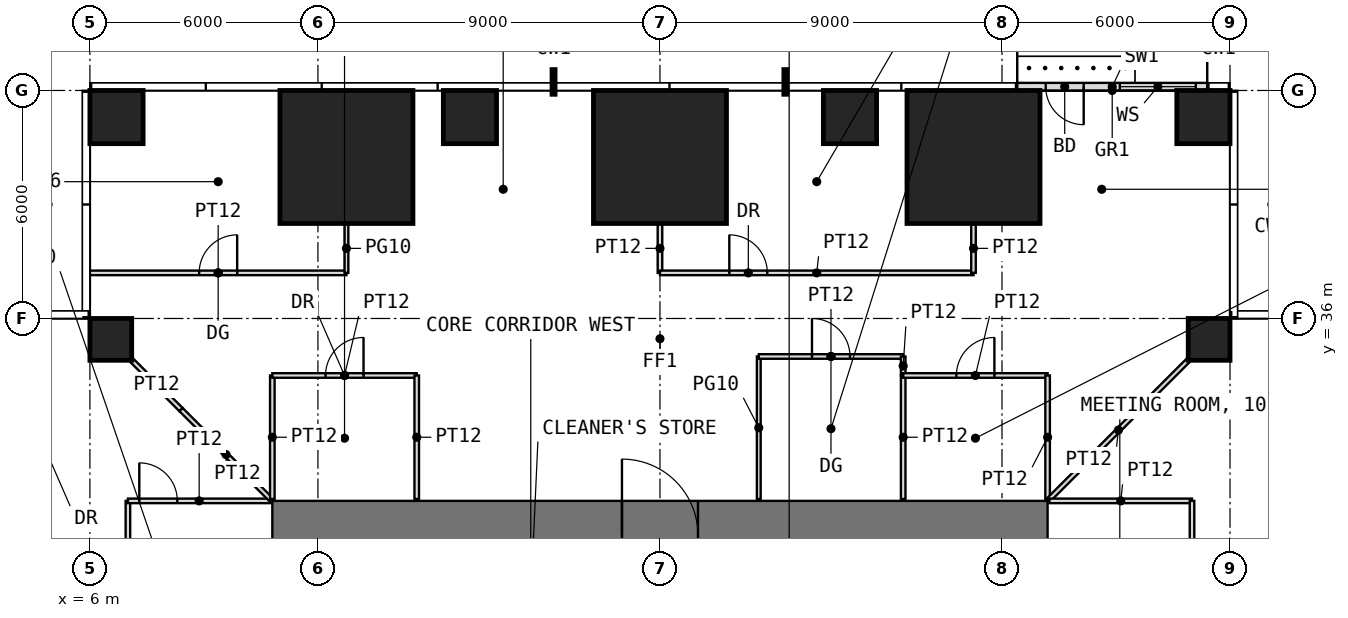
"""IFC4 building model, lengths in metres.
Left out: names, types, materials, properties, quantities, classifications, styles, units other than length and angle.
Written with IfcOpenShell. Run it as: python <this file> out.ifc"""

import sys

from ifc_helpers import new_model, si_unit, direction, frame, frame_2d, origin, origin_2d, place, context, subcontext, project, spatial, rectangle, extrude, element, fill, save


model = new_model("IFC4")
c1 = context("Model", 3, precision=1e-05, world=origin(), true_north=direction((0.0, 1.0)))
c2 = subcontext(c1, "Body", "Model", "MODEL_VIEW")
j1 = project(units=[si_unit("LENGTHUNIT", "METRE"), si_unit("PLANEANGLEUNIT", "RADIAN")], contexts=[c1])
p1 = place(None, origin())
s1 = spatial("IfcSite", under=j1, at=p1, CompositionType="ELEMENT")
p2 = place(p1, origin())
s2 = spatial("IfcBuilding", under=s1, at=p2, CompositionType="ELEMENT")
p3 = place(p2, frame((0.0, 0.0, 70.5)))
s3 = spatial("IfcBuildingStorey", under=s2, at=p3, CompositionType="ELEMENT", Elevation=70.5)
for number, where, z_axis, x_axis in (
    (1, (6.55, 35.45, 0.0), (0.0, 0.0, 1.0), (1.0, 0.0, 0.0)),
    (2, (35.45, 35.45, 0.0), (0.0, 0.0, 1.0), (1.0, 0.0, 0.0)),
):
    element("IfcColumn", number, at=place(p3, frame(where, z_axis=z_axis, x_axis=x_axis)), inside=s3, PredefinedType="COLUMN", context=c2, shape_type="SweptSolid", body=[
        extrude(rectangle(XDim=1.1, YDim=1.1, at=origin_2d()), origin(), (0.0, 0.0, 1.0), 4.0),
    ])
p4 = place(p3, frame((6.7, 41.3, 0.0), z_axis=(0.0, 0.0, 1.0), x_axis=(1.0, 0.0, 0.0)))
e3 = element("IfcColumn", 3, at=p4, inside=s3, PredefinedType="COLUMN", context=c2, shape_type="SweptSolid", body=[
    extrude(rectangle(XDim=1.4, YDim=1.4, at=origin_2d()), origin(), (0.0, 0.0, 1.0), 4.0),
])
p5 = place(p3, frame((12.75, 40.25, 0.0), z_axis=(0.0, 0.0, 1.0), x_axis=(1.0, 0.0, 0.0)))
e4 = element("IfcColumn", 4, at=p5, inside=s3, PredefinedType="COLUMN", context=c2, shape_type="SweptSolid", body=[
    extrude(rectangle(XDim=3.5, YDim=3.5, at=origin_2d()), origin(), (0.0, 0.0, 1.0), 4.0),
])
p6 = place(p3, frame((16.0, 41.3, 0.0), z_axis=(0.0, 0.0, 1.0), x_axis=(1.0, 0.0, 0.0)))
e5 = element("IfcColumn", 5, at=p6, inside=s3, PredefinedType="COLUMN", context=c2, shape_type="SweptSolid", body=[
    extrude(rectangle(XDim=1.4, YDim=1.4, at=origin_2d()), origin(), (0.0, 0.0, 1.0), 4.0),
])
p7 = place(p3, frame((21.0, 40.25, 0.0), z_axis=(0.0, 0.0, 1.0), x_axis=(1.0, 0.0, 0.0)))
e6 = element("IfcColumn", 6, at=p7, inside=s3, PredefinedType="COLUMN", context=c2, shape_type="SweptSolid", body=[
    extrude(rectangle(XDim=3.5, YDim=3.5, at=origin_2d()), origin(), (0.0, 0.0, 1.0), 4.0),
])
p8 = place(p3, frame((26.0, 41.3, 0.0), z_axis=(0.0, 0.0, 1.0), x_axis=(1.0, 0.0, 0.0)))
e7 = element("IfcColumn", 7, at=p8, inside=s3, PredefinedType="COLUMN", context=c2, shape_type="SweptSolid", body=[
    extrude(rectangle(XDim=1.4, YDim=1.4, at=origin_2d()), origin(), (0.0, 0.0, 1.0), 4.0),
])
p9 = place(p3, frame((29.25, 40.25, 0.0), z_axis=(0.0, 0.0, 1.0), x_axis=(1.0, 0.0, 0.0)))
e8 = element("IfcColumn", 8, at=p9, inside=s3, PredefinedType="COLUMN", context=c2, shape_type="SweptSolid", body=[
    extrude(rectangle(XDim=3.5, YDim=3.5, at=origin_2d()), origin(), (0.0, 0.0, 1.0), 4.0),
])
p10 = place(p3, frame((35.3, 41.3, 0.0), z_axis=(0.0, 0.0, 1.0), x_axis=(1.0, 0.0, 0.0)))
e9 = element("IfcColumn", 9, at=p10, inside=s3, PredefinedType="COLUMN", context=c2, shape_type="SweptSolid", body=[
    extrude(rectangle(XDim=1.4, YDim=1.4, at=origin_2d()), origin(), (0.0, 0.0, 1.0), 4.0),
])
p11 = place(p3, frame((35.4, 42.1, 0.0), z_axis=(0.0, 0.0, 1.0), x_axis=(-1.0, 0.0, 0.0)))
e10 = element("IfcWall", 10, at=p11, inside=s3, PredefinedType="USERDEFINED", context=c2, shape_type="SweptSolid", body=[
    extrude(rectangle(XDim=5.0, YDim=0.2, at=frame_2d((2.5, 0.0))), origin(), (0.0, 0.0, 1.0), 3.75),
])
p12 = place(p11, frame((3.25, 0.0, 0.0)))
e11 = element("IfcOpeningElement", 11, at=p12, cuts=e10, PredefinedType="OPENING", context=c2, shape_type="SweptSolid", body=[
    extrude(rectangle(XDim=1.0, YDim=2.4, at=frame_2d((0.5, 1.2))), frame((0.0, 0.11, 0.0), z_axis=(0.0, -1.0, 0.0), x_axis=(1.0, 0.0, 0.0)), (0.0, 0.0, 1.0), 0.22),
])
p13 = place(p11, frame((0.3, 0.0, 0.3)))
e12 = element("IfcOpeningElement", 12, at=p13, cuts=e10, PredefinedType="OPENING", context=c2, shape_type="SweptSolid", body=[
    extrude(rectangle(XDim=2.0, YDim=2.7, at=frame_2d((1.0, 1.35))), frame((0.0, 0.11, 0.0), z_axis=(0.0, -1.0, 0.0), x_axis=(1.0, 0.0, 0.0)), (0.0, 0.0, 1.0), 0.22),
])
p14 = place(p3, frame((10.8, 30.3, -0.05), z_axis=(0.0, 0.0, 1.0), x_axis=(1.0, 0.0, 0.0)))
e13 = element("IfcWall", 13, at=p14, inside=s3, PredefinedType="SHEAR", context=c2, shape_type="SweptSolid", body=[
    extrude(rectangle(XDim=20.4, YDim=1.8, at=frame_2d((10.2, 0.0))), origin(), (0.0, 0.0, 1.0), 4.0),
])
p15 = place(p14, frame((9.2, 0.0, 0.05)))
e14 = element("IfcOpeningElement", 14, at=p15, cuts=e13, PredefinedType="OPENING", context=c2, shape_type="SweptSolid", body=[
    extrude(rectangle(XDim=2.0, YDim=2.2, at=frame_2d((1.0, 1.1))), frame((0.0, 0.91, 0.0), z_axis=(0.0, -1.0, 0.0), x_axis=(1.0, 0.0, 0.0)), (0.0, 0.0, 1.0), 1.82),
])
p16 = place(p3, frame((6.0, 37.2, 0.0), z_axis=(0.0, 0.0, 1.0), x_axis=(1.0, 0.0, 0.0)))
e15 = element("IfcWall", 15, at=p16, inside=s3, PredefinedType="PARTITIONING", context=c2, shape_type="SweptSolid", body=[
    extrude(rectangle(XDim=6.75, YDim=0.12, at=frame_2d((3.375, 0.0))), origin(), (0.0, 0.0, 1.0), 3.75),
])
p17 = place(p16, frame((2.875, 0.0, 0.0)))
e16 = element("IfcOpeningElement", 16, at=p17, cuts=e15, PredefinedType="OPENING", context=c2, shape_type="SweptSolid", body=[
    extrude(rectangle(XDim=1.0, YDim=2.4, at=frame_2d((0.5, 1.2))), frame((0.0, 0.07, 0.0), z_axis=(0.0, -1.0, 0.0), x_axis=(1.0, 0.0, 0.0)), (0.0, 0.0, 1.0), 0.14),
])
p18 = place(p3, frame((7.0, 28.4, 0.0), z_axis=(0.0, 0.0, 1.0), x_axis=(0.0, 1.0, 0.0)))
e17 = element("IfcWall", 17, at=p18, inside=s3, PredefinedType="PARTITIONING", context=c2, shape_type="SweptSolid", body=[
    extrude(rectangle(XDim=2.8, YDim=0.12, at=frame_2d((1.4, 0.0))), origin(), (0.0, 0.0, 1.0), 3.75),
])
p19 = place(p3, frame((7.0, 31.2, 0.0), z_axis=(0.0, 0.0, 1.0), x_axis=(1.0, 0.0, 0.0)))
e18 = element("IfcWall", 18, at=p19, inside=s3, PredefinedType="PARTITIONING", context=c2, shape_type="SweptSolid", body=[
    extrude(rectangle(XDim=3.75, YDim=0.12, at=frame_2d((1.875, 0.0))), origin(), (0.0, 0.0, 1.0), 3.75),
])
p20 = place(p19, frame((0.3, 0.0, 0.0)))
e19 = element("IfcOpeningElement", 19, at=p20, cuts=e18, PredefinedType="OPENING", context=c2, shape_type="SweptSolid", body=[
    extrude(rectangle(XDim=1.0, YDim=2.4, at=frame_2d((0.5, 1.2))), frame((0.0, 0.07, 0.0), z_axis=(0.0, -1.0, 0.0), x_axis=(1.0, 0.0, 0.0)), (0.0, 0.0, 1.0), 0.14),
])
p21 = place(p3, frame((7.11, 34.89, 0.0), z_axis=(0.0, 0.0, 1.0), x_axis=(0.707106781187, -0.707106781187, 0.0)))
e20 = element("IfcWall", 20, at=p21, inside=s3, PredefinedType="PARTITIONING", context=c2, shape_type="SweptSolid", body=[
    extrude(rectangle(XDim=1.822, YDim=0.12, at=frame_2d((0.911, 0.0))), origin(), (0.0, 0.0, 1.0), 3.75),
])
p22 = place(p3, frame((8.398, 33.602, 0.0), z_axis=(0.0, 0.0, 1.0), x_axis=(0.707106781187, -0.707106781187, 0.0)))
e21 = element("IfcWall", 21, at=p22, inside=s3, PredefinedType="PARTITIONING", context=c2, shape_type="SweptSolid", body=[
    extrude(rectangle(XDim=3.346, YDim=0.12, at=frame_2d((1.673, 0.0))), origin(), (0.0, 0.0, 1.0), 3.75),
])
p23 = place(p3, frame((10.8, 31.25, 0.0), z_axis=(0.0, 0.0, 1.0), x_axis=(0.0, 1.0, 0.0)))
e22 = element("IfcWall", 22, at=p23, inside=s3, PredefinedType="PARTITIONING", context=c2, shape_type="SweptSolid", body=[
    extrude(rectangle(XDim=3.25, YDim=0.12, at=frame_2d((1.625, 0.0))), origin(), (0.0, 0.0, 1.0), 3.75),
])
p24 = place(p3, frame((10.8, 34.5, 0.0), z_axis=(0.0, 0.0, 1.0), x_axis=(1.0, 0.0, 0.0)))
e23 = element("IfcWall", 23, at=p24, inside=s3, PredefinedType="PARTITIONING", context=c2, shape_type="SweptSolid", body=[
    extrude(rectangle(XDim=3.8, YDim=0.12, at=frame_2d((1.9, 0.0))), origin(), (0.0, 0.0, 1.0), 3.75),
])
p25 = place(p24, frame((1.4, 0.0, 0.0)))
e24 = element("IfcOpeningElement", 24, at=p25, cuts=e23, PredefinedType="OPENING", context=c2, shape_type="SweptSolid", body=[
    extrude(rectangle(XDim=1.0, YDim=2.2, at=frame_2d((0.5, 1.1))), frame((0.0, 0.07, 0.0), z_axis=(0.0, -1.0, 0.0), x_axis=(1.0, 0.0, 0.0)), (0.0, 0.0, 1.0), 0.14),
])
p26 = place(p3, frame((12.75, 37.2, 0.0), z_axis=(0.0, 0.0, 1.0), x_axis=(0.0, 1.0, 0.0)))
e25 = element("IfcWall", 25, at=p26, inside=s3, PredefinedType="PARTITIONING", context=c2, shape_type="SweptSolid", body=[
    extrude(rectangle(XDim=1.29, YDim=0.1, at=frame_2d((0.645, 0.0))), origin(), (0.0, 0.0, 1.0), 3.75),
])
p27 = place(p3, frame((14.6, 31.25, 0.0), z_axis=(0.0, 0.0, 1.0), x_axis=(0.0, 1.0, 0.0)))
e26 = element("IfcWall", 26, at=p27, inside=s3, PredefinedType="PARTITIONING", context=c2, shape_type="SweptSolid", body=[
    extrude(rectangle(XDim=3.25, YDim=0.12, at=frame_2d((1.625, 0.0))), origin(), (0.0, 0.0, 1.0), 3.75),
])
p28 = place(p3, frame((21.0, 37.2, 0.0), z_axis=(0.0, 0.0, 1.0), x_axis=(0.0, 1.0, 0.0)))
e27 = element("IfcWall", 27, at=p28, inside=s3, PredefinedType="PARTITIONING", context=c2, shape_type="SweptSolid", body=[
    extrude(rectangle(XDim=1.29, YDim=0.12, at=frame_2d((0.645, 0.0))), origin(), (0.0, 0.0, 1.0), 3.75),
])
p29 = place(p3, frame((21.0, 37.2, 0.0), z_axis=(0.0, 0.0, 1.0), x_axis=(1.0, 0.0, 0.0)))
e28 = element("IfcWall", 28, at=p29, inside=s3, PredefinedType="PARTITIONING", context=c2, shape_type="SweptSolid", body=[
    extrude(rectangle(XDim=8.25, YDim=0.12, at=frame_2d((4.125, 0.0))), origin(), (0.0, 0.0, 1.0), 3.75),
])
p30 = place(p29, frame((1.825, 0.0, 0.0)))
e29 = element("IfcOpeningElement", 29, at=p30, cuts=e28, PredefinedType="OPENING", context=c2, shape_type="SweptSolid", body=[
    extrude(rectangle(XDim=1.0, YDim=2.2, at=frame_2d((0.5, 1.1))), frame((0.0, 0.07, 0.0), z_axis=(0.0, -1.0, 0.0), x_axis=(1.0, 0.0, 0.0)), (0.0, 0.0, 1.0), 0.14),
])
p31 = place(p3, frame((23.6, 31.25, 0.0), z_axis=(0.0, 0.0, 1.0), x_axis=(0.0, 1.0, 0.0)))
e30 = element("IfcWall", 30, at=p31, inside=s3, PredefinedType="PARTITIONING", context=c2, shape_type="SweptSolid", body=[
    extrude(rectangle(XDim=3.75, YDim=0.1, at=frame_2d((1.875, 0.0))), origin(), (0.0, 0.0, 1.0), 3.75),
])
p32 = place(p3, frame((23.6, 35.0, 0.0), z_axis=(0.0, 0.0, 1.0), x_axis=(1.0, 0.0, 0.0)))
e31 = element("IfcWall", 31, at=p32, inside=s3, PredefinedType="PARTITIONING", context=c2, shape_type="SweptSolid", body=[
    extrude(rectangle(XDim=3.8, YDim=0.12, at=frame_2d((1.9, 0.0))), origin(), (0.0, 0.0, 1.0), 3.75),
])
p33 = place(p32, frame((1.4, 0.0, 0.0)))
e32 = element("IfcOpeningElement", 32, at=p33, cuts=e31, PredefinedType="OPENING", context=c2, shape_type="SweptSolid", body=[
    extrude(rectangle(XDim=1.0, YDim=2.4, at=frame_2d((0.5, 1.2))), frame((0.0, 0.07, 0.0), z_axis=(0.0, -1.0, 0.0), x_axis=(1.0, 0.0, 0.0)), (0.0, 0.0, 1.0), 0.14),
])
p34 = place(p3, frame((27.4, 31.25, 0.0), z_axis=(0.0, 0.0, 1.0), x_axis=(0.0, 1.0, 0.0)))
e33 = element("IfcWall", 33, at=p34, inside=s3, PredefinedType="PARTITIONING", context=c2, shape_type="SweptSolid", body=[
    extrude(rectangle(XDim=3.25, YDim=0.12, at=frame_2d((1.625, 0.0))), origin(), (0.0, 0.0, 1.0), 3.75),
])
p35 = place(p3, frame((27.4, 34.5, 0.0), z_axis=(0.0, 0.0, 1.0), x_axis=(0.0, 1.0, 0.0)))
e34 = element("IfcWall", 34, at=p35, inside=s3, PredefinedType="PARTITIONING", context=c2, shape_type="SweptSolid", body=[
    extrude(rectangle(XDim=0.5, YDim=0.12, at=frame_2d((0.25, 0.0))), origin(), (0.0, 0.0, 1.0), 3.75),
])
p36 = place(p3, frame((27.4, 34.5, 0.0), z_axis=(0.0, 0.0, 1.0), x_axis=(1.0, 0.0, 0.0)))
e35 = element("IfcWall", 35, at=p36, inside=s3, PredefinedType="PARTITIONING", context=c2, shape_type="SweptSolid", body=[
    extrude(rectangle(XDim=3.8, YDim=0.12, at=frame_2d((1.9, 0.0))), origin(), (0.0, 0.0, 1.0), 3.75),
])
p37 = place(p36, frame((1.4, 0.0, 0.0)))
e36 = element("IfcOpeningElement", 36, at=p37, cuts=e35, PredefinedType="OPENING", context=c2, shape_type="SweptSolid", body=[
    extrude(rectangle(XDim=1.0, YDim=2.2, at=frame_2d((0.5, 1.1))), frame((0.0, 0.07, 0.0), z_axis=(0.0, -1.0, 0.0), x_axis=(1.0, 0.0, 0.0)), (0.0, 0.0, 1.0), 0.14),
])
p38 = place(p3, frame((29.25, 37.2, 0.0), z_axis=(0.0, 0.0, 1.0), x_axis=(0.0, 1.0, 0.0)))
e37 = element("IfcWall", 37, at=p38, inside=s3, PredefinedType="PARTITIONING", context=c2, shape_type="SweptSolid", body=[
    extrude(rectangle(XDim=1.29, YDim=0.12, at=frame_2d((0.645, 0.0))), origin(), (0.0, 0.0, 1.0), 3.75),
])
p39 = place(p3, frame((31.2, 31.25, 0.0), z_axis=(0.0, 0.0, 1.0), x_axis=(0.0, 1.0, 0.0)))
e38 = element("IfcWall", 38, at=p39, inside=s3, PredefinedType="PARTITIONING", context=c2, shape_type="SweptSolid", body=[
    extrude(rectangle(XDim=3.25, YDim=0.12, at=frame_2d((1.625, 0.0))), origin(), (0.0, 0.0, 1.0), 3.75),
])
p40 = place(p3, frame((31.235, 31.235, 0.0), z_axis=(0.0, 0.0, 1.0), x_axis=(0.707106781187, 0.707106781187, 0.0)))
e39 = element("IfcWall", 39, at=p40, inside=s3, PredefinedType="PARTITIONING", context=c2, shape_type="SweptSolid", body=[
    extrude(rectangle(XDim=5.168, YDim=0.12, at=frame_2d((2.584, 0.0))), origin(), (0.0, 0.0, 1.0), 3.75),
])
p41 = place(p3, frame((31.25, 31.2, 0.0), z_axis=(0.0, 0.0, 1.0), x_axis=(1.0, 0.0, 0.0)))
e40 = element("IfcWall", 40, at=p41, inside=s3, PredefinedType="PARTITIONING", context=c2, shape_type="SweptSolid", body=[
    extrude(rectangle(XDim=3.75, YDim=0.12, at=frame_2d((1.875, 0.0))), origin(), (0.0, 0.0, 1.0), 3.75),
])
p42 = place(p3, frame((35.0, 24.4, 0.0), z_axis=(0.0, 0.0, 1.0), x_axis=(0.0, 1.0, 0.0)))
e41 = element("IfcWall", 41, at=p42, inside=s3, PredefinedType="PARTITIONING", context=c2, shape_type="SweptSolid", body=[
    extrude(rectangle(XDim=6.8, YDim=0.12, at=frame_2d((3.4, 0.0))), origin(), (0.0, 0.0, 1.0), 3.75),
])
p43 = place(p42, frame((2.9, 0.0, 0.0)))
e42 = element("IfcOpeningElement", 42, at=p43, cuts=e41, PredefinedType="OPENING", context=c2, shape_type="SweptSolid", body=[
    extrude(rectangle(XDim=1.0, YDim=2.4, at=frame_2d((0.5, 1.2))), frame((0.0, 0.07, 0.0), z_axis=(0.0, -1.0, 0.0), x_axis=(1.0, 0.0, 0.0)), (0.0, 0.0, 1.0), 0.14),
])
p44 = place(p12, origin())
e43 = element("IfcDoor", 43, at=p44, inside=s3, OperationType="SINGLE_SWING_LEFT", PredefinedType="DOOR", context=c2, shape_type="SweptSolid", body=[
    extrude(rectangle(XDim=1.0, YDim=2.4, at=frame_2d((0.5, 1.2))), frame((0.0, 0.025, 0.0), z_axis=(0.0, -1.0, 0.0), x_axis=(1.0, 0.0, 0.0)), (0.0, 0.0, 1.0), 0.05),
])
fill(e11, e43)
p45 = place(p13, origin())
e44 = element("IfcWindow", 44, at=p45, inside=s3, PartitioningType="SINGLE_PANEL", PredefinedType="WINDOW", context=c2, shape_type="SweptSolid", body=[
    extrude(rectangle(XDim=2.0, YDim=2.7, at=frame_2d((1.0, 1.35))), frame((0.0, 0.03, 0.0), z_axis=(0.0, -1.0, 0.0), x_axis=(1.0, 0.0, 0.0)), (0.0, 0.0, 1.0), 0.06),
])
fill(e12, e44)
p46 = place(p15, origin())
e45 = element("IfcDoor", 45, at=p46, inside=s3, OperationType="DOUBLE_DOOR_SINGLE_SWING", PredefinedType="DOOR", context=c2, shape_type="SweptSolid", body=[
    extrude(rectangle(XDim=2.0, YDim=2.2, at=frame_2d((1.0, 1.1))), frame((0.0, 0.025, 0.0), z_axis=(0.0, -1.0, 0.0), x_axis=(1.0, 0.0, 0.0)), (0.0, 0.0, 1.0), 0.05),
])
fill(e14, e45)
p47 = place(p25, origin())
e46 = element("IfcDoor", 46, at=p47, inside=s3, OperationType="SINGLE_SWING_RIGHT", PredefinedType="DOOR", context=c2, shape_type="SweptSolid", body=[
    extrude(rectangle(XDim=1.0, YDim=2.2, at=frame_2d((0.5, 1.1))), frame((0.0, 0.025, 0.0), z_axis=(0.0, -1.0, 0.0), x_axis=(1.0, 0.0, 0.0)), (0.0, 0.0, 1.0), 0.05),
])
fill(e24, e46)
p48 = place(p33, origin())
e47 = element("IfcDoor", 47, at=p48, inside=s3, OperationType="SINGLE_SWING_LEFT", PredefinedType="DOOR", context=c2, shape_type="SweptSolid", body=[
    extrude(rectangle(XDim=1.0, YDim=2.4, at=frame_2d((0.5, 1.2))), frame((0.0, 0.025, 0.0), z_axis=(0.0, -1.0, 0.0), x_axis=(1.0, 0.0, 0.0)), (0.0, 0.0, 1.0), 0.05),
])
fill(e32, e47)
p49 = place(p37, origin())
e48 = element("IfcDoor", 48, at=p49, inside=s3, OperationType="SINGLE_SWING_RIGHT", PredefinedType="DOOR", context=c2, shape_type="SweptSolid", body=[
    extrude(rectangle(XDim=1.0, YDim=2.2, at=frame_2d((0.5, 1.1))), frame((0.0, 0.025, 0.0), z_axis=(0.0, -1.0, 0.0), x_axis=(1.0, 0.0, 0.0)), (0.0, 0.0, 1.0), 0.05),
])
fill(e36, e48)
p50 = place(p17, origin())
e49 = element("IfcDoor", 49, at=p50, inside=s3, OperationType="SINGLE_SWING_RIGHT", PredefinedType="DOOR", context=c2, shape_type="SweptSolid", body=[
    extrude(rectangle(XDim=1.0, YDim=2.4, at=frame_2d((0.5, 1.2))), frame((0.0, 0.025, 0.0), z_axis=(0.0, -1.0, 0.0), x_axis=(1.0, 0.0, 0.0)), (0.0, 0.0, 1.0), 0.05),
])
fill(e16, e49)
p51 = place(p30, origin())
e50 = element("IfcDoor", 50, at=p51, inside=s3, OperationType="SINGLE_SWING_LEFT", PredefinedType="DOOR", context=c2, shape_type="SweptSolid", body=[
    extrude(rectangle(XDim=1.0, YDim=2.2, at=frame_2d((0.5, 1.1))), frame((0.0, 0.025, 0.0), z_axis=(0.0, -1.0, 0.0), x_axis=(1.0, 0.0, 0.0)), (0.0, 0.0, 1.0), 0.05),
])
fill(e29, e50)
p52 = place(p20, origin())
e51 = element("IfcDoor", 51, at=p52, inside=s3, OperationType="SINGLE_SWING_LEFT", PredefinedType="DOOR", context=c2, shape_type="SweptSolid", body=[
    extrude(rectangle(XDim=1.0, YDim=2.4, at=frame_2d((0.5, 1.2))), frame((0.0, 0.025, 0.0), z_axis=(0.0, -1.0, 0.0), x_axis=(1.0, 0.0, 0.0)), (0.0, 0.0, 1.0), 0.05),
])
fill(e19, e51)
save(model, sys.argv[1])
